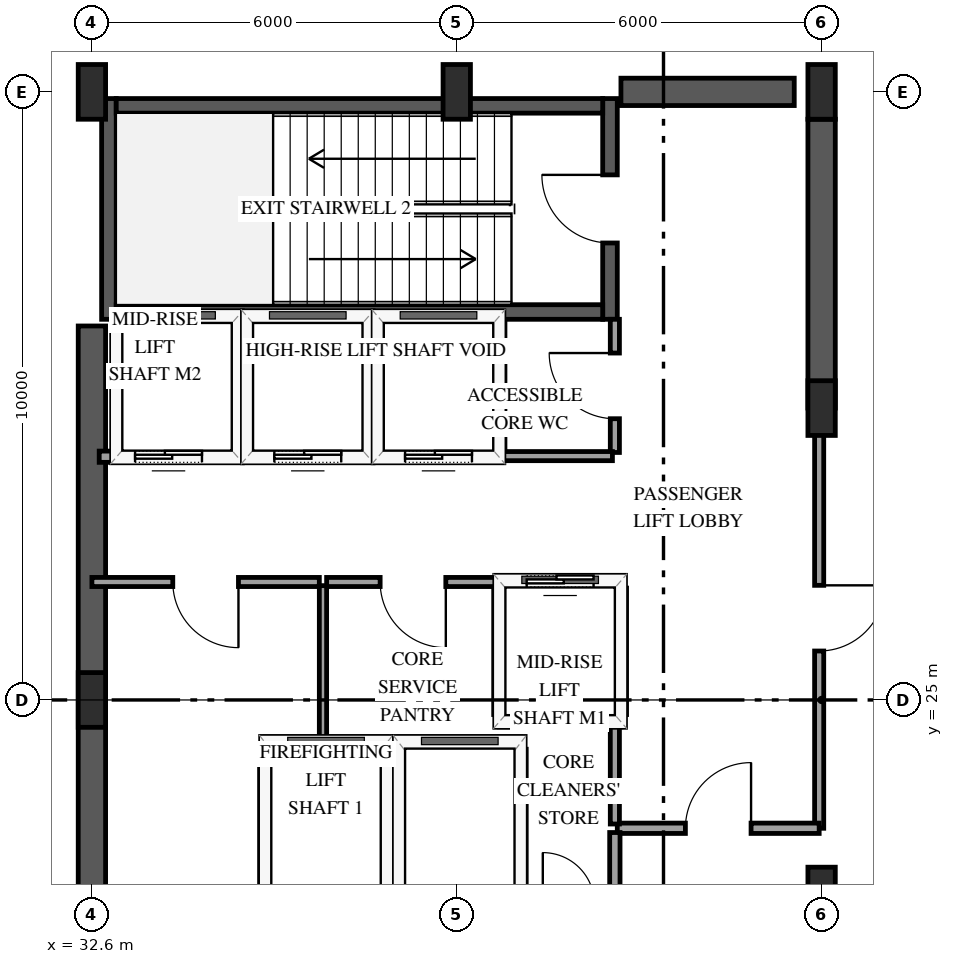
"""IFC4 building model, lengths in metres.
Left out: names, types, materials, properties, quantities, classifications, styles, units other than length and angle.
Written with IfcOpenShell. Run it as: python <this file> out.ifc"""

import sys

from ifc_helpers import new_model, si_unit, direction, frame, frame_2d, origin, origin_2d, place, context, subcontext, project, spatial, rectangle, extrude, element, fill, save


model = new_model("IFC4")
c1 = context("Model", 3, precision=1e-05, world=origin(), true_north=direction((0.0, 1.0)))
c2 = subcontext(c1, "Body", "Model", "MODEL_VIEW")
j1 = project(units=[si_unit("LENGTHUNIT", "METRE"), si_unit("PLANEANGLEUNIT", "RADIAN")], contexts=[c1])
p1 = place(None, origin())
s1 = spatial("IfcSite", under=j1, at=p1, CompositionType="ELEMENT")
p2 = place(p1, origin())
s2 = spatial("IfcBuilding", under=s1, at=p2, CompositionType="ELEMENT")
p3 = place(p2, frame((0.0, 0.0, 237.4)))
s3 = spatial("IfcBuildingStorey", under=s2, at=p3, CompositionType="ELEMENT", Elevation=237.4)
p4 = place(p3, frame((32.88, 31.26, 0.0), z_axis=(0.0, 0.0, 1.0), x_axis=(0.0, 1.0, 0.0)))
e1 = element("IfcWall", 1, at=p4, inside=s3, PredefinedType="SHEAR", context=c2, shape_type="SweptSolid", body=[
    extrude(rectangle(XDim=3.63, YDim=0.24, at=frame_2d((1.815, 0.0))), origin(), (0.0, 0.0, 1.0), 5.1),
])
p5 = place(p3, frame((41.12, 31.26, 0.0), z_axis=(0.0, 0.0, 1.0), x_axis=(0.0, 1.0, 0.0)))
e2 = element("IfcWall", 2, at=p5, inside=s3, PredefinedType="SHEAR", context=c2, shape_type="SweptSolid", body=[
    extrude(rectangle(XDim=3.63, YDim=0.24, at=frame_2d((1.815, 0.0))), origin(), (0.0, 0.0, 1.0), 5.1),
])
p6 = place(p5, frame((1.255, 0.0, 0.0)))
e3 = element("IfcOpeningElement", 3, at=p6, cuts=e2, PredefinedType="OPENING", context=c2, shape_type="SweptSolid", body=[
    extrude(rectangle(XDim=1.12, YDim=2.15, at=frame_2d((0.56, 1.075))), frame((0.0, 0.13, 0.0), z_axis=(0.0, -1.0, 0.0), x_axis=(1.0, 0.0, 0.0)), (0.0, 0.0, 1.0), 0.26),
])
for number, where, z_axis, x_axis in (
    (4, (33.0, 31.38, 0.0), (0.0, 0.0, 1.0), (1.0, 0.0, 0.0)),
    (5, (33.0, 34.77, 0.0), (0.0, 0.0, 1.0), (1.0, 0.0, 0.0)),
):
    element("IfcWall", number, at=place(p3, frame(where, z_axis=z_axis, x_axis=x_axis)), inside=s3, PredefinedType="SHEAR", context=c2, shape_type="SweptSolid", body=[
        extrude(rectangle(XDim=8.0, YDim=0.24, at=frame_2d((4.0, 0.0))), origin(), (0.0, 0.0, 1.0), 5.1),
    ])
p7 = place(p3, frame((32.6, 18.85, 0.0), z_axis=(0.0, 0.0, 1.0), x_axis=(0.0, 1.0, 0.0)))
e6 = element("IfcWall", 6, at=p7, inside=s3, PredefinedType="SHEAR", context=c2, shape_type="SweptSolid", body=[
    extrude(rectangle(XDim=12.3, YDim=0.45, at=frame_2d((6.15, 0.0))), origin(), (0.0, 0.0, 1.0), 5.1),
])
p8 = place(p3, frame((41.3, 35.0, 0.0), z_axis=(0.0, 0.0, 1.0), x_axis=(1.0, 0.0, 0.0)))
e7 = element("IfcWall", 7, at=p8, inside=s3, PredefinedType="SHEAR", context=c2, shape_type="SweptSolid", body=[
    extrude(rectangle(XDim=2.85, YDim=0.45, at=frame_2d((1.425, 0.0))), origin(), (0.0, 0.0, 1.0), 5.1),
])
p9 = place(p3, frame((44.6, 29.8, 0.0), z_axis=(0.0, 0.0, 1.0), x_axis=(0.0, 1.0, 0.0)))
e8 = element("IfcWall", 8, at=p9, inside=s3, PredefinedType="SHEAR", context=c2, shape_type="SweptSolid", body=[
    extrude(rectangle(XDim=4.75, YDim=0.45, at=frame_2d((2.375, 0.0))), origin(), (0.0, 0.0, 1.0), 5.1),
])
for number, where, z_axis, x_axis in (
    (9, (32.6, 25.0, 0.0), (0.0, 0.0, 1.0), (1.0, 0.0, 0.0)),
    (10, (32.6, 35.0, 0.0), (0.0, 0.0, 1.0), (1.0, 0.0, 0.0)),
    (11, (38.6, 35.0, 0.0), (0.0, 0.0, 1.0), (1.0, 0.0, 0.0)),
    (12, (44.6, 21.8, 0.0), (0.0, 0.0, 1.0), (1.0, 0.0, 0.0)),
    (13, (44.6, 29.8, 0.0), (0.0, 0.0, 1.0), (1.0, 0.0, 0.0)),
    (14, (44.6, 35.0, 0.0), (0.0, 0.0, 1.0), (1.0, 0.0, 0.0)),
):
    element("IfcColumn", number, at=place(p3, frame(where, z_axis=z_axis, x_axis=x_axis)), inside=s3, PredefinedType="PILASTER", context=c2, shape_type="SweptSolid", body=[
        extrude(rectangle(XDim=0.45, YDim=0.9, at=origin_2d()), origin(), (0.0, 0.0, 1.0), 4.8),
    ])
p10 = place(p3, frame((35.45, 24.3, 0.0), z_axis=(0.0, 0.0, 1.0), x_axis=(1.0, 0.0, 0.0)))
e15 = element("IfcWall", 15, at=p10, inside=s3, PredefinedType="SOLIDWALL", context=c2, shape_type="SweptSolid", body=[
    extrude(rectangle(XDim=2.0, YDim=0.185, at=frame_2d((1.0, 0.0))), origin(), (0.0, 0.0, 1.0), 4.8),
])
for number, where, z_axis, x_axis in (
    (16, (35.45, 21.81, 0.0), (0.0, 0.0, 1.0), (0.0, 1.0, 0.0)),
    (17, (37.45, 21.81, 0.0), (0.0, 0.0, 1.0), (0.0, 1.0, 0.0)),
):
    element("IfcWall", number, at=place(p3, frame(where, z_axis=z_axis, x_axis=x_axis)), inside=s3, PredefinedType="SOLIDWALL", context=c2, shape_type="SweptSolid", body=[
        extrude(rectangle(XDim=2.38, YDim=0.185, at=frame_2d((1.19, 0.0))), origin(), (0.0, 0.0, 1.0), 4.8),
    ])
p11 = place(p3, frame((37.65, 24.3, 0.0), z_axis=(0.0, 0.0, 1.0), x_axis=(1.0, 0.0, 0.0)))
e18 = element("IfcWall", 18, at=p11, inside=s3, PredefinedType="SOLIDWALL", context=c2, shape_type="SweptSolid", body=[
    extrude(rectangle(XDim=2.0, YDim=0.185, at=frame_2d((1.0, 0.0))), origin(), (0.0, 0.0, 1.0), 4.8),
])
p12 = place(p3, frame((39.65, 21.81, 0.0), z_axis=(0.0, 0.0, 1.0), x_axis=(0.0, 1.0, 0.0)))
e19 = element("IfcWall", 19, at=p12, inside=s3, PredefinedType="SOLIDWALL", context=c2, shape_type="SweptSolid", body=[
    extrude(rectangle(XDim=2.38, YDim=0.185, at=frame_2d((1.19, 0.0))), origin(), (0.0, 0.0, 1.0), 4.8),
])
p13 = place(p3, frame((39.3, 24.65, 0.0), z_axis=(0.0, 0.0, 1.0), x_axis=(1.0, 0.0, 0.0)))
e20 = element("IfcWall", 20, at=p13, inside=s3, PredefinedType="SOLIDWALL", context=c2, shape_type="SweptSolid", body=[
    extrude(rectangle(XDim=2.0, YDim=0.185, at=frame_2d((1.0, 0.0))), origin(), (0.0, 0.0, 1.0), 4.8),
])
p14 = place(p3, frame((39.3, 26.95, 0.0), z_axis=(0.0, 0.0, 1.0), x_axis=(1.0, 0.0, 0.0)))
e21 = element("IfcWall", 21, at=p14, inside=s3, PredefinedType="SOLIDWALL", context=c2, shape_type="SweptSolid", body=[
    extrude(rectangle(XDim=2.0, YDim=0.185, at=frame_2d((1.0, 0.0))), origin(), (0.0, 0.0, 1.0), 4.8),
])
p15 = place(p14, frame((0.45, 0.0, 0.0)))
e22 = element("IfcOpeningElement", 22, at=p15, cuts=e21, PredefinedType="OPENING", context=c2, shape_type="SweptSolid", body=[
    extrude(rectangle(XDim=1.1, YDim=2.15, at=frame_2d((0.55, 1.075))), frame((0.0, 0.103, 0.0), z_axis=(0.0, -1.0, 0.0), x_axis=(1.0, 0.0, 0.0)), (0.0, 0.0, 1.0), 0.205),
])
for number, where, z_axis, x_axis in (
    (23, (39.3, 24.76, 0.0), (0.0, 0.0, 1.0), (0.0, 1.0, 0.0)),
    (24, (41.3, 24.76, 0.0), (0.0, 0.0, 1.0), (0.0, 1.0, 0.0)),
):
    element("IfcWall", number, at=place(p3, frame(where, z_axis=z_axis, x_axis=x_axis)), inside=s3, PredefinedType="SOLIDWALL", context=c2, shape_type="SweptSolid", body=[
        extrude(rectangle(XDim=2.08, YDim=0.185, at=frame_2d((1.04, 0.0))), origin(), (0.0, 0.0, 1.0), 4.8),
    ])
p16 = place(p3, frame((32.72, 29.0, 0.0), z_axis=(0.0, 0.0, 1.0), x_axis=(1.0, 0.0, 0.0)))
e25 = element("IfcWall", 25, at=p16, inside=s3, PredefinedType="SOLIDWALL", context=c2, shape_type="SweptSolid", body=[
    extrude(rectangle(XDim=2.28, YDim=0.185, at=frame_2d((1.14, 0.0))), origin(), (0.0, 0.0, 1.0), 4.8),
])
p17 = place(p16, frame((0.59, 0.0, 0.0)))
e26 = element("IfcOpeningElement", 26, at=p17, cuts=e25, PredefinedType="OPENING", context=c2, shape_type="SweptSolid", body=[
    extrude(rectangle(XDim=1.1, YDim=2.15, at=frame_2d((0.55, 1.075))), frame((0.0, 0.103, 0.0), z_axis=(0.0, -1.0, 0.0), x_axis=(1.0, 0.0, 0.0)), (0.0, 0.0, 1.0), 0.205),
])
p18 = place(p3, frame((35.0, 29.11, 0.0), z_axis=(0.0, 0.0, 1.0), x_axis=(0.0, 1.0, 0.0)))
e27 = element("IfcWall", 27, at=p18, inside=s3, PredefinedType="SOLIDWALL", context=c2, shape_type="SweptSolid", body=[
    extrude(rectangle(XDim=2.1, YDim=0.185, at=frame_2d((1.05, 0.0))), origin(), (0.0, 0.0, 1.0), 4.8),
])
p19 = place(p3, frame((35.15, 29.0, 0.0), z_axis=(0.0, 0.0, 1.0), x_axis=(1.0, 0.0, 0.0)))
e28 = element("IfcWall", 28, at=p19, inside=s3, PredefinedType="SOLIDWALL", context=c2, shape_type="SweptSolid", body=[
    extrude(rectangle(XDim=2.0, YDim=0.185, at=frame_2d((1.0, 0.0))), origin(), (0.0, 0.0, 1.0), 4.8),
])
p20 = place(p19, frame((0.45, 0.0, 0.0)))
e29 = element("IfcOpeningElement", 29, at=p20, cuts=e28, PredefinedType="OPENING", context=c2, shape_type="SweptSolid", body=[
    extrude(rectangle(XDim=1.1, YDim=2.15, at=frame_2d((0.55, 1.075))), frame((0.0, 0.103, 0.0), z_axis=(0.0, -1.0, 0.0), x_axis=(1.0, 0.0, 0.0)), (0.0, 0.0, 1.0), 0.205),
])
p21 = place(p3, frame((37.15, 29.11, 0.0), z_axis=(0.0, 0.0, 1.0), x_axis=(0.0, 1.0, 0.0)))
e30 = element("IfcWall", 30, at=p21, inside=s3, PredefinedType="SOLIDWALL", context=c2, shape_type="SweptSolid", body=[
    extrude(rectangle(XDim=2.1, YDim=0.185, at=frame_2d((1.05, 0.0))), origin(), (0.0, 0.0, 1.0), 4.8),
])
p22 = place(p3, frame((37.3, 29.0, 0.0), z_axis=(0.0, 0.0, 1.0), x_axis=(1.0, 0.0, 0.0)))
e31 = element("IfcWall", 31, at=p22, inside=s3, PredefinedType="SOLIDWALL", context=c2, shape_type="SweptSolid", body=[
    extrude(rectangle(XDim=2.0, YDim=0.185, at=frame_2d((1.0, 0.0))), origin(), (0.0, 0.0, 1.0), 4.8),
])
p23 = place(p22, frame((0.45, 0.0, 0.0)))
e32 = element("IfcOpeningElement", 32, at=p23, cuts=e31, PredefinedType="OPENING", context=c2, shape_type="SweptSolid", body=[
    extrude(rectangle(XDim=1.1, YDim=2.15, at=frame_2d((0.55, 1.075))), frame((0.0, 0.103, 0.0), z_axis=(0.0, -1.0, 0.0), x_axis=(1.0, 0.0, 0.0)), (0.0, 0.0, 1.0), 0.205),
])
p24 = place(p3, frame((39.3, 29.11, 0.0), z_axis=(0.0, 0.0, 1.0), x_axis=(0.0, 1.0, 0.0)))
e33 = element("IfcWall", 33, at=p24, inside=s3, PredefinedType="SOLIDWALL", context=c2, shape_type="SweptSolid", body=[
    extrude(rectangle(XDim=2.1, YDim=0.185, at=frame_2d((1.05, 0.0))), origin(), (0.0, 0.0, 1.0), 4.8),
])
p25 = place(p3, frame((44.56, 29.8, 0.0), z_axis=(0.0, 0.0, 1.0), x_axis=(0.0, -1.0, 0.0)))
e34 = element("IfcWall", 34, at=p25, inside=s3, PredefinedType="PARTITIONING", context=c2, shape_type="SweptSolid", body=[
    extrude(rectangle(XDim=6.91, YDim=0.15, at=frame_2d((3.455, 0.0))), origin(), (0.0, 0.0, 1.0), 3.84),
])
p26 = place(p25, frame((2.915, 0.0, 0.0)))
e35 = element("IfcOpeningElement", 35, at=p26, cuts=e34, PredefinedType="OPENING", context=c2, shape_type="SweptSolid", body=[
    extrude(rectangle(XDim=1.08, YDim=2.15, at=frame_2d((0.54, 1.075))), frame((0.0, 0.085, 0.0), z_axis=(0.0, -1.0, 0.0), x_axis=(1.0, 0.0, 0.0)), (0.0, 0.0, 1.0), 0.17),
])
p27 = place(p3, frame((36.34, 26.94, 0.0), z_axis=(0.0, 0.0, 1.0), x_axis=(-1.0, 0.0, 0.0)))
e36 = element("IfcWall", 36, at=p27, inside=s3, PredefinedType="PARTITIONING", context=c2, shape_type="SweptSolid", body=[
    extrude(rectangle(XDim=3.74, YDim=0.15, at=frame_2d((1.87, 0.0))), origin(), (0.0, 0.0, 1.0), 4.8),
])
p28 = place(p27, frame((1.33, 0.0, 0.0)))
e37 = element("IfcOpeningElement", 37, at=p28, cuts=e36, PredefinedType="OPENING", context=c2, shape_type="SweptSolid", body=[
    extrude(rectangle(XDim=1.08, YDim=2.15, at=frame_2d((0.54, 1.075))), frame((0.0, 0.085, 0.0), z_axis=(0.0, -1.0, 0.0), x_axis=(1.0, 0.0, 0.0)), (0.0, 0.0, 1.0), 0.17),
])
p29 = place(p3, frame((41.24, 22.89, 0.0), z_axis=(0.0, 0.0, 1.0), x_axis=(1.0, 0.0, 0.0)))
e38 = element("IfcWall", 38, at=p29, inside=s3, PredefinedType="PARTITIONING", context=c2, shape_type="SweptSolid", body=[
    extrude(rectangle(XDim=3.32, YDim=0.17, at=frame_2d((1.66, 0.0))), origin(), (0.0, 0.0, 1.0), 4.8),
])
p30 = place(p29, frame((1.12, 0.0, 0.0)))
e39 = element("IfcOpeningElement", 39, at=p30, cuts=e38, PredefinedType="OPENING", context=c2, shape_type="SweptSolid", body=[
    extrude(rectangle(XDim=1.08, YDim=2.15, at=frame_2d((0.54, 1.075))), frame((0.0, 0.095, 0.0), z_axis=(0.0, -1.0, 0.0), x_axis=(1.0, 0.0, 0.0)), (0.0, 0.0, 1.0), 0.19),
])
p31 = place(p3, frame((39.3, 26.94, 0.0), z_axis=(0.0, 0.0, 1.0), x_axis=(-1.0, 0.0, 0.0)))
e40 = element("IfcWall", 40, at=p31, inside=s3, PredefinedType="PARTITIONING", context=c2, shape_type="SweptSolid", body=[
    extrude(rectangle(XDim=2.84, YDim=0.15, at=frame_2d((1.42, 0.0))), origin(), (0.0, 0.0, 1.0), 4.8),
])
p32 = place(p31, frame((0.88, 0.0, 0.0)))
e41 = element("IfcOpeningElement", 41, at=p32, cuts=e40, PredefinedType="OPENING", context=c2, shape_type="SweptSolid", body=[
    extrude(rectangle(XDim=1.08, YDim=2.15, at=frame_2d((0.54, 1.075))), frame((0.0, 0.085, 0.0), z_axis=(0.0, -1.0, 0.0), x_axis=(1.0, 0.0, 0.0)), (0.0, 0.0, 1.0), 0.17),
])
p33 = place(p3, frame((36.4, 26.88, 0.0), z_axis=(0.0, 0.0, 1.0), x_axis=(0.0, -1.0, 0.0)))
e42 = element("IfcWall", 42, at=p33, inside=s3, PredefinedType="PARTITIONING", context=c2, shape_type="SweptSolid", body=[
    extrude(rectangle(XDim=2.58, YDim=0.12, at=frame_2d((1.29, 0.0))), origin(), (0.0, 0.0, 1.0), 4.8),
])
p34 = place(p3, frame((41.2, 29.07, 0.0), z_axis=(0.0, 0.0, 1.0), x_axis=(0.0, 1.0, 0.0)))
e43 = element("IfcWall", 43, at=p34, inside=s3, PredefinedType="PARTITIONING", context=c2, shape_type="SweptSolid", body=[
    extrude(rectangle(XDim=2.19, YDim=0.15, at=frame_2d((1.095, 0.0))), origin(), (0.0, 0.0, 1.0), 4.8),
])
p35 = place(p34, frame((0.555, 0.0, 0.0)))
e44 = element("IfcOpeningElement", 44, at=p35, cuts=e43, PredefinedType="OPENING", context=c2, shape_type="SweptSolid", body=[
    extrude(rectangle(XDim=1.08, YDim=2.15, at=frame_2d((0.54, 1.075))), frame((0.0, 0.085, 0.0), z_axis=(0.0, -1.0, 0.0), x_axis=(1.0, 0.0, 0.0)), (0.0, 0.0, 1.0), 0.17),
])
p36 = place(p3, frame((39.3, 29.01, 0.0), z_axis=(0.0, 0.0, 1.0), x_axis=(1.0, 0.0, 0.0)))
e45 = element("IfcWall", 45, at=p36, inside=s3, PredefinedType="PARTITIONING", context=c2, shape_type="SweptSolid", body=[
    extrude(rectangle(XDim=1.86, YDim=0.15, at=frame_2d((0.93, 0.0))), origin(), (0.0, 0.0, 1.0), 4.8),
])
p37 = place(p3, frame((41.2, 22.96, 0.0), z_axis=(0.0, 0.0, 1.0), x_axis=(0.0, 1.0, 0.0)))
e46 = element("IfcWall", 46, at=p37, inside=s3, PredefinedType="PARTITIONING", context=c2, shape_type="SweptSolid", body=[
    extrude(rectangle(XDim=1.69, YDim=0.15, at=frame_2d((0.845, 0.0))), origin(), (0.0, 0.0, 1.0), 4.8),
])
p38 = place(p3, frame((41.2, 21.7, 0.0), z_axis=(0.0, 0.0, 1.0), x_axis=(0.0, 1.0, 0.0)))
e47 = element("IfcWall", 47, at=p38, inside=s3, PredefinedType="PARTITIONING", context=c2, shape_type="SweptSolid", body=[
    extrude(rectangle(XDim=1.12, YDim=0.17, at=frame_2d((0.56, 0.0))), origin(), (0.0, 0.0, 1.0), 4.8),
])
p39 = place(p15, origin())
e48 = element("IfcDoor", 48, at=p39, inside=s3, OperationType="SLIDING_TO_LEFT", PredefinedType="DOOR", context=c2, shape_type="SweptSolid", body=[
    extrude(rectangle(XDim=1.1, YDim=2.15, at=frame_2d((0.55, 1.075))), frame((0.0, 0.025, 0.0), z_axis=(0.0, -1.0, 0.0), x_axis=(1.0, 0.0, 0.0)), (0.0, 0.0, 1.0), 0.05),
])
fill(e22, e48)
p40 = place(p17, origin())
e49 = element("IfcDoor", 49, at=p40, inside=s3, OperationType="SLIDING_TO_LEFT", PredefinedType="DOOR", context=c2, shape_type="SweptSolid", body=[
    extrude(rectangle(XDim=1.1, YDim=2.15, at=frame_2d((0.55, 1.075))), frame((0.0, 0.025, 0.0), z_axis=(0.0, -1.0, 0.0), x_axis=(1.0, 0.0, 0.0)), (0.0, 0.0, 1.0), 0.05),
])
fill(e26, e49)
p41 = place(p20, origin())
e50 = element("IfcDoor", 50, at=p41, inside=s3, OperationType="SLIDING_TO_LEFT", PredefinedType="DOOR", context=c2, shape_type="SweptSolid", body=[
    extrude(rectangle(XDim=1.1, YDim=2.15, at=frame_2d((0.55, 1.075))), frame((0.0, 0.025, 0.0), z_axis=(0.0, -1.0, 0.0), x_axis=(1.0, 0.0, 0.0)), (0.0, 0.0, 1.0), 0.05),
])
fill(e29, e50)
p42 = place(p23, origin())
e51 = element("IfcDoor", 51, at=p42, inside=s3, OperationType="SLIDING_TO_LEFT", PredefinedType="DOOR", context=c2, shape_type="SweptSolid", body=[
    extrude(rectangle(XDim=1.1, YDim=2.15, at=frame_2d((0.55, 1.075))), frame((0.0, 0.025, 0.0), z_axis=(0.0, -1.0, 0.0), x_axis=(1.0, 0.0, 0.0)), (0.0, 0.0, 1.0), 0.05),
])
fill(e32, e51)
p43 = place(p6, origin())
e52 = element("IfcDoor", 52, at=p43, inside=s3, OperationType="SINGLE_SWING_RIGHT", PredefinedType="DOOR", context=c2, shape_type="SweptSolid", body=[
    extrude(rectangle(XDim=1.12, YDim=2.15, at=frame_2d((0.56, 1.075))), frame((0.0, 0.025, 0.0), z_axis=(0.0, -1.0, 0.0), x_axis=(1.0, 0.0, 0.0)), (0.0, 0.0, 1.0), 0.05),
])
fill(e3, e52)
p44 = place(p26, origin())
e53 = element("IfcDoor", 53, at=p44, inside=s3, OperationType="SINGLE_SWING_LEFT", PredefinedType="DOOR", context=c2, shape_type="SweptSolid", body=[
    extrude(rectangle(XDim=1.08, YDim=2.15, at=frame_2d((0.54, 1.075))), frame((0.0, 0.025, 0.0), z_axis=(0.0, -1.0, 0.0), x_axis=(1.0, 0.0, 0.0)), (0.0, 0.0, 1.0), 0.05),
])
fill(e35, e53)
p45 = place(p28, origin())
e54 = element("IfcDoor", 54, at=p45, inside=s3, OperationType="SINGLE_SWING_LEFT", PredefinedType="DOOR", context=c2, shape_type="SweptSolid", body=[
    extrude(rectangle(XDim=1.08, YDim=2.15, at=frame_2d((0.54, 1.075))), frame((0.0, 0.025, 0.0), z_axis=(0.0, -1.0, 0.0), x_axis=(1.0, 0.0, 0.0)), (0.0, 0.0, 1.0), 0.05),
])
fill(e37, e54)
p46 = place(p30, origin())
e55 = element("IfcDoor", 55, at=p46, inside=s3, OperationType="SINGLE_SWING_RIGHT", PredefinedType="DOOR", context=c2, shape_type="SweptSolid", body=[
    extrude(rectangle(XDim=1.08, YDim=2.15, at=frame_2d((0.54, 1.075))), frame((0.0, 0.025, 0.0), z_axis=(0.0, -1.0, 0.0), x_axis=(1.0, 0.0, 0.0)), (0.0, 0.0, 1.0), 0.05),
])
fill(e39, e55)
p47 = place(p32, origin())
e56 = element("IfcDoor", 56, at=p47, inside=s3, OperationType="SINGLE_SWING_LEFT", PredefinedType="DOOR", context=c2, shape_type="SweptSolid", body=[
    extrude(rectangle(XDim=1.08, YDim=2.15, at=frame_2d((0.54, 1.075))), frame((0.0, 0.025, 0.0), z_axis=(0.0, -1.0, 0.0), x_axis=(1.0, 0.0, 0.0)), (0.0, 0.0, 1.0), 0.05),
])
fill(e41, e56)
p48 = place(p35, origin())
e57 = element("IfcDoor", 57, at=p48, inside=s3, OperationType="SINGLE_SWING_RIGHT", PredefinedType="DOOR", context=c2, shape_type="SweptSolid", body=[
    extrude(rectangle(XDim=1.08, YDim=2.15, at=frame_2d((0.54, 1.075))), frame((0.0, 0.025, 0.0), z_axis=(0.0, -1.0, 0.0), x_axis=(1.0, 0.0, 0.0)), (0.0, 0.0, 1.0), 0.05),
])
fill(e44, e57)
save(model, sys.argv[1])
